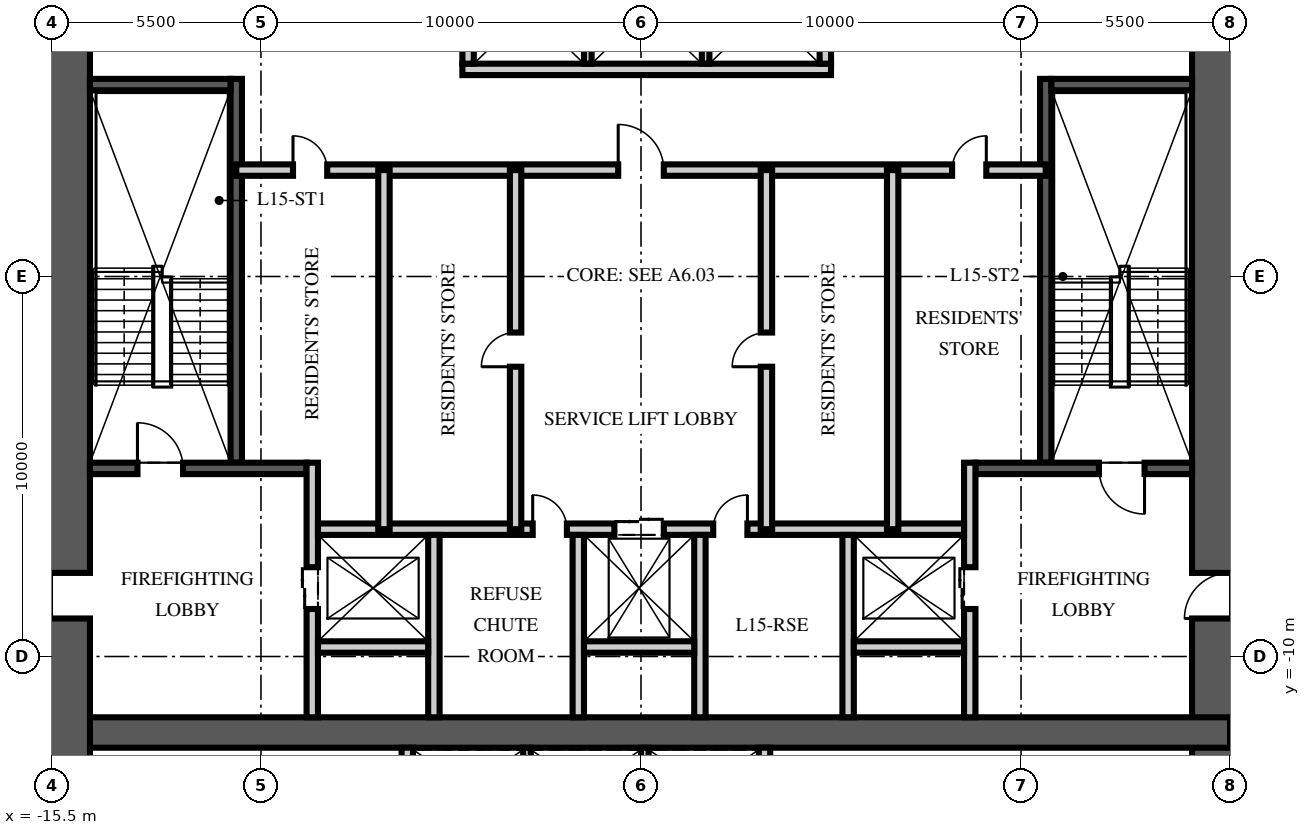
"""IFC4 building model, lengths in metres.
Left out: names, types, materials, properties, quantities, classifications, styles, units other than length and angle.
Written with IfcOpenShell. Run it as: python <this file> out.ifc"""

import sys

from ifc_helpers import new_model, si_unit, direction, frame, frame_2d, origin, place, context, subcontext, project, spatial, rectangle, extrude, element, fill, save


model = new_model("IFC4")
c1 = context("Model", 3, precision=1e-05, world=origin(), true_north=direction((0.0, 1.0)))
c2 = subcontext(c1, "Body", "Model", "MODEL_VIEW")
j1 = project(units=[si_unit("LENGTHUNIT", "METRE"), si_unit("PLANEANGLEUNIT", "RADIAN")], contexts=[c1])
p1 = place(None, origin())
s1 = spatial("IfcSite", under=j1, at=p1, CompositionType="ELEMENT")
p2 = place(p1, origin())
s2 = spatial("IfcBuilding", under=s1, at=p2, CompositionType="ELEMENT")
p3 = place(p2, frame((0.0, 0.0, 62.25)))
s3 = spatial("IfcBuildingStorey", under=s2, at=p3, CompositionType="ELEMENT", Elevation=62.25)
p4 = place(p3, frame((15.5, -15.5, -0.25), z_axis=(0.0, 0.0, 1.0), x_axis=(0.0, 1.0, 0.0)))
e1 = element("IfcWall", 1, at=p4, inside=s3, PredefinedType="SHEAR", context=c2, shape_type="SweptSolid", body=[
    extrude(rectangle(XDim=31.0, YDim=2.0, at=frame_2d((15.5, 0.0))), origin(), (0.0, 0.0, 1.0), 3.75),
])
p5 = place(p4, frame((6.5, 0.0, 0.25)))
e2 = element("IfcOpeningElement", 2, at=p5, cuts=e1, PredefinedType="OPENING", context=c2, shape_type="SweptSolid", body=[
    extrude(rectangle(XDim=1.2, YDim=2.1, at=frame_2d((0.6, 1.05))), frame((0.0, 1.01, 0.0), z_axis=(0.0, -1.0, 0.0), x_axis=(1.0, 0.0, 0.0)), (0.0, 0.0, 1.0), 2.02),
])
p6 = place(p4, frame((23.0, 0.0, 0.25)))
e3 = element("IfcOpeningElement", 3, at=p6, cuts=e1, PredefinedType="OPENING", context=c2, shape_type="SweptSolid", body=[
    extrude(rectangle(XDim=1.8, YDim=2.1, at=frame_2d((0.9, 1.05))), frame((0.0, 1.01, 0.0), z_axis=(0.0, -1.0, 0.0), x_axis=(1.0, 0.0, 0.0)), (0.0, 0.0, 1.0), 2.02),
])
p7 = place(p3, frame((-15.5, -12.0, -0.25), z_axis=(0.0, 0.0, 1.0), x_axis=(1.0, 0.0, 0.0)))
e4 = element("IfcWall", 4, at=p7, inside=s3, PredefinedType="SHEAR", context=c2, shape_type="SweptSolid", body=[
    extrude(rectangle(XDim=31.0, YDim=0.8, at=frame_2d((15.5, 0.0))), origin(), (0.0, 0.0, 1.0), 3.75),
])
p8 = place(p3, frame((-15.5, -15.5, -0.25), z_axis=(0.0, 0.0, 1.0), x_axis=(0.0, 1.0, 0.0)))
e5 = element("IfcWall", 5, at=p8, inside=s3, PredefinedType="SHEAR", context=c2, shape_type="SweptSolid", body=[
    extrude(rectangle(XDim=31.0, YDim=2.0, at=frame_2d((15.5, 0.0))), origin(), (0.0, 0.0, 1.0), 3.75),
])
p9 = place(p8, frame((6.5, 0.0, 0.25)))
e6 = element("IfcOpeningElement", 6, at=p9, cuts=e5, PredefinedType="OPENING", context=c2, shape_type="SweptSolid", body=[
    extrude(rectangle(XDim=1.2, YDim=2.1, at=frame_2d((0.6, 1.05))), frame((0.0, 1.01, 0.0), z_axis=(0.0, -1.0, 0.0), x_axis=(1.0, 0.0, 0.0)), (0.0, 0.0, 1.0), 2.02),
])
p10 = place(p8, frame((23.0, 0.0, 0.25)))
e7 = element("IfcOpeningElement", 7, at=p10, cuts=e5, PredefinedType="OPENING", context=c2, shape_type="SweptSolid", body=[
    extrude(rectangle(XDim=1.8, YDim=2.1, at=frame_2d((0.9, 1.05))), frame((0.0, 1.01, 0.0), z_axis=(0.0, -1.0, 0.0), x_axis=(1.0, 0.0, 0.0)), (0.0, 0.0, 1.0), 2.02),
])
p11 = place(p3, frame((-10.65, -4.9, 0.0), z_axis=(0.0, 0.0, 1.0), x_axis=(0.0, 1.0, 0.0)))
e8 = element("IfcWall", 8, at=p11, inside=s3, PredefinedType="SOLIDWALL", context=c2, shape_type="SweptSolid", body=[
    extrude(rectangle(XDim=10.1, YDim=0.3, at=frame_2d((5.05, 0.0))), origin(), (0.0, 0.0, 1.0), 3.5),
])
p12 = place(p3, frame((-14.5, -5.05, 0.0), z_axis=(0.0, 0.0, 1.0), x_axis=(1.0, 0.0, 0.0)))
e9 = element("IfcWall", 9, at=p12, inside=s3, PredefinedType="SOLIDWALL", context=c2, shape_type="SweptSolid", body=[
    extrude(rectangle(XDim=5.7, YDim=0.3, at=frame_2d((2.85, 0.0))), origin(), (0.0, 0.0, 1.0), 3.5),
])
p13 = place(p12, frame((1.25, 0.0, 0.0)))
e10 = element("IfcOpeningElement", 10, at=p13, cuts=e9, PredefinedType="OPENING", context=c2, shape_type="SweptSolid", body=[
    extrude(rectangle(XDim=1.2, YDim=2.1, at=frame_2d((0.6, 1.05))), frame((0.0, 0.16, 0.0), z_axis=(0.0, -1.0, 0.0), x_axis=(1.0, 0.0, 0.0)), (0.0, 0.0, 1.0), 0.32),
])
p14 = place(p3, frame((-14.5, 5.05, 0.0), z_axis=(0.0, 0.0, 1.0), x_axis=(1.0, 0.0, 0.0)))
e11 = element("IfcWall", 11, at=p14, inside=s3, PredefinedType="SOLIDWALL", context=c2, shape_type="SweptSolid", body=[
    extrude(rectangle(XDim=3.7, YDim=0.3, at=frame_2d((1.85, 0.0))), origin(), (0.0, 0.0, 1.0), 3.5),
])
p15 = place(p3, frame((-8.65, -11.6, 0.0), z_axis=(0.0, 0.0, 1.0), x_axis=(0.0, 1.0, 0.0)))
e12 = element("IfcWall", 12, at=p15, inside=s3, PredefinedType="PARTITIONING", context=c2, shape_type="SweptSolid", body=[
    extrude(rectangle(XDim=6.7, YDim=0.3, at=frame_2d((3.35, 0.0))), origin(), (0.0, 0.0, 1.0), 3.5),
])
p16 = place(p15, frame((2.85, 0.0, 0.0)))
e13 = element("IfcOpeningElement", 13, at=p16, cuts=e12, PredefinedType="OPENING", context=c2, shape_type="SweptSolid", body=[
    extrude(rectangle(XDim=1.1, YDim=2.1, at=frame_2d((0.55, 1.05))), frame((0.0, 0.16, 0.0), z_axis=(0.0, -1.0, 0.0), x_axis=(1.0, 0.0, 0.0)), (0.0, 0.0, 1.0), 0.32),
])
p17 = place(p3, frame((10.65, -4.9, 0.0), z_axis=(0.0, 0.0, 1.0), x_axis=(0.0, 1.0, 0.0)))
e14 = element("IfcWall", 14, at=p17, inside=s3, PredefinedType="SOLIDWALL", context=c2, shape_type="SweptSolid", body=[
    extrude(rectangle(XDim=10.1, YDim=0.3, at=frame_2d((5.05, 0.0))), origin(), (0.0, 0.0, 1.0), 3.5),
])
p18 = place(p3, frame((14.5, -5.05, 0.0), z_axis=(0.0, 0.0, 1.0), x_axis=(-1.0, 0.0, 0.0)))
e15 = element("IfcWall", 15, at=p18, inside=s3, PredefinedType="SOLIDWALL", context=c2, shape_type="SweptSolid", body=[
    extrude(rectangle(XDim=5.7, YDim=0.3, at=frame_2d((2.85, 0.0))), origin(), (0.0, 0.0, 1.0), 3.5),
])
p19 = place(p18, frame((1.25, 0.0, 0.0)))
e16 = element("IfcOpeningElement", 16, at=p19, cuts=e15, PredefinedType="OPENING", context=c2, shape_type="SweptSolid", body=[
    extrude(rectangle(XDim=1.2, YDim=2.1, at=frame_2d((0.6, 1.05))), frame((0.0, 0.16, 0.0), z_axis=(0.0, -1.0, 0.0), x_axis=(1.0, 0.0, 0.0)), (0.0, 0.0, 1.0), 0.32),
])
p20 = place(p3, frame((14.5, 5.05, 0.0), z_axis=(0.0, 0.0, 1.0), x_axis=(-1.0, 0.0, 0.0)))
e17 = element("IfcWall", 17, at=p20, inside=s3, PredefinedType="SOLIDWALL", context=c2, shape_type="SweptSolid", body=[
    extrude(rectangle(XDim=3.7, YDim=0.3, at=frame_2d((1.85, 0.0))), origin(), (0.0, 0.0, 1.0), 3.5),
])
p21 = place(p3, frame((8.65, -11.6, 0.0), z_axis=(0.0, 0.0, 1.0), x_axis=(0.0, 1.0, 0.0)))
e18 = element("IfcWall", 18, at=p21, inside=s3, PredefinedType="PARTITIONING", context=c2, shape_type="SweptSolid", body=[
    extrude(rectangle(XDim=6.7, YDim=0.3, at=frame_2d((3.35, 0.0))), origin(), (0.0, 0.0, 1.0), 3.5),
])
p22 = place(p21, frame((2.85, 0.0, 0.0)))
e19 = element("IfcOpeningElement", 19, at=p22, cuts=e18, PredefinedType="OPENING", context=c2, shape_type="SweptSolid", body=[
    extrude(rectangle(XDim=1.1, YDim=2.1, at=frame_2d((0.55, 1.05))), frame((0.0, 0.16, 0.0), z_axis=(0.0, -1.0, 0.0), x_axis=(1.0, 0.0, 0.0)), (0.0, 0.0, 1.0), 0.32),
])
p23 = place(p3, frame((-8.5, -6.65, 0.0), z_axis=(0.0, 0.0, 1.0), x_axis=(1.0, 0.0, 0.0)))
e20 = element("IfcWall", 20, at=p23, inside=s3, PredefinedType="PARTITIONING", context=c2, shape_type="SweptSolid", body=[
    extrude(rectangle(XDim=17.0, YDim=0.3, at=frame_2d((8.5, 0.0))), origin(), (0.0, 0.0, 1.0), 3.5),
])
p24 = place(p23, frame((7.8, 0.0, 0.0)))
e21 = element("IfcOpeningElement", 21, at=p24, cuts=e20, PredefinedType="OPENING", context=c2, shape_type="SweptSolid", body=[
    extrude(rectangle(XDim=1.3, YDim=2.4, at=frame_2d((0.65, 1.2))), frame((0.0, 0.16, 0.0), z_axis=(0.0, -1.0, 0.0), x_axis=(1.0, 0.0, 0.0)), (0.0, 0.0, 1.0), 0.32),
])
p25 = place(p23, frame((5.65, 0.0, 0.0)))
e22 = element("IfcOpeningElement", 22, at=p25, cuts=e20, PredefinedType="OPENING", context=c2, shape_type="SweptSolid", body=[
    extrude(rectangle(XDim=0.9, YDim=2.1, at=frame_2d((0.45, 1.05))), frame((0.0, 0.16, 0.0), z_axis=(0.0, -1.0, 0.0), x_axis=(1.0, 0.0, 0.0)), (0.0, 0.0, 1.0), 0.32),
])
p26 = place(p23, frame((10.4, 0.0, 0.0)))
e23 = element("IfcOpeningElement", 23, at=p26, cuts=e20, PredefinedType="OPENING", context=c2, shape_type="SweptSolid", body=[
    extrude(rectangle(XDim=0.9, YDim=2.1, at=frame_2d((0.45, 1.05))), frame((0.0, 0.16, 0.0), z_axis=(0.0, -1.0, 0.0), x_axis=(1.0, 0.0, 0.0)), (0.0, 0.0, 1.0), 0.32),
])
for number, where, z_axis, x_axis in (
    (24, (-5.45, -11.6, 0.0), (0.0, 0.0, 1.0), (0.0, 1.0, 0.0)),
    (25, (-1.65, -11.6, 0.0), (0.0, 0.0, 1.0), (0.0, 1.0, 0.0)),
    (26, (1.55, -11.6, 0.0), (0.0, 0.0, 1.0), (0.0, 1.0, 0.0)),
    (27, (5.45, -11.6, 0.0), (0.0, 0.0, 1.0), (0.0, 1.0, 0.0)),
):
    element("IfcWall", number, at=place(p3, frame(where, z_axis=z_axis, x_axis=x_axis)), inside=s3, PredefinedType="PARTITIONING", context=c2, shape_type="SweptSolid", body=[
        extrude(rectangle(XDim=4.8, YDim=0.3, at=frame_2d((2.4, 0.0))), origin(), (0.0, 0.0, 1.0), 3.5),
    ])
for number, where, z_axis, x_axis in (
    (28, (-8.5, -9.75, 0.0), (0.0, 0.0, 1.0), (1.0, 0.0, 0.0)),
    (29, (-1.5, -9.75, 0.0), (0.0, 0.0, 1.0), (1.0, 0.0, 0.0)),
    (30, (5.6, -9.75, 0.0), (0.0, 0.0, 1.0), (1.0, 0.0, 0.0)),
):
    element("IfcWall", number, at=place(p3, frame(where, z_axis=z_axis, x_axis=x_axis)), inside=s3, PredefinedType="PARTITIONING", context=c2, shape_type="SweptSolid", body=[
        extrude(rectangle(XDim=2.9, YDim=0.3, at=frame_2d((1.45, 0.0))), origin(), (0.0, 0.0, 1.0), 3.5),
    ])
p27 = place(p3, frame((-4.7, 5.45, 0.0), z_axis=(0.0, 0.0, 1.0), x_axis=(1.0, 0.0, 0.0)))
e31 = element("IfcWall", 31, at=p27, inside=s3, PredefinedType="PARTITIONING", context=c2, shape_type="SweptSolid", body=[
    extrude(rectangle(XDim=9.7, YDim=0.3, at=frame_2d((4.85, 0.0))), origin(), (0.0, 0.0, 1.0), 3.5),
])
for number, where, z_axis, x_axis in (
    (32, (-4.55, 5.6, 0.0), (0.0, 0.0, 1.0), (0.0, 1.0, 0.0)),
    (33, (4.85, 5.6, 0.0), (0.0, 0.0, 1.0), (0.0, 1.0, 0.0)),
):
    element("IfcWall", number, at=place(p3, frame(where, z_axis=z_axis, x_axis=x_axis)), inside=s3, PredefinedType="PARTITIONING", context=c2, shape_type="SweptSolid", body=[
        extrude(rectangle(XDim=2.8, YDim=0.3, at=frame_2d((1.4, 0.0))), origin(), (0.0, 0.0, 1.0), 3.5),
    ])
for number, where, z_axis, x_axis in (
    (34, (-1.4, 5.6, 0.0), (0.0, 0.0, 1.0), (0.0, 1.0, 0.0)),
    (35, (1.7, 5.6, 0.0), (0.0, 0.0, 1.0), (0.0, 1.0, 0.0)),
):
    element("IfcWall", number, at=place(p3, frame(where, z_axis=z_axis, x_axis=x_axis)), inside=s3, PredefinedType="PARTITIONING", context=c2, shape_type="SweptSolid", body=[
        extrude(rectangle(XDim=2.8, YDim=0.2, at=frame_2d((1.4, 0.0))), origin(), (0.0, 0.0, 1.0), 3.5),
    ])
for number, where, z_axis, x_axis in (
    (36, (-6.15, -14.5, 0.0), (0.0, 0.0, 1.0), (0.0, 1.0, 0.0)),
    (37, (3.25, -14.5, 0.0), (0.0, 0.0, 1.0), (0.0, 1.0, 0.0)),
):
    element("IfcWall", number, at=place(p3, frame(where, z_axis=z_axis, x_axis=x_axis)), inside=s3, PredefinedType="PARTITIONING", context=c2, shape_type="SweptSolid", body=[
        extrude(rectangle(XDim=2.1, YDim=0.3, at=frame_2d((1.05, 0.0))), origin(), (0.0, 0.0, 1.0), 3.5),
    ])
for number, where, z_axis, x_axis in (
    (38, (-3.0, -14.5, 0.0), (0.0, 0.0, 1.0), (0.0, 1.0, 0.0)),
    (39, (0.1, -14.5, 0.0), (0.0, 0.0, 1.0), (0.0, 1.0, 0.0)),
):
    element("IfcWall", number, at=place(p3, frame(where, z_axis=z_axis, x_axis=x_axis)), inside=s3, PredefinedType="PARTITIONING", context=c2, shape_type="SweptSolid", body=[
        extrude(rectangle(XDim=2.1, YDim=0.2, at=frame_2d((1.05, 0.0))), origin(), (0.0, 0.0, 1.0), 3.5),
    ])
p28 = place(p3, frame((-10.65, 2.8, 0.0), z_axis=(0.0, 0.0, 1.0), x_axis=(1.0, 0.0, 0.0)))
e40 = element("IfcWall", 40, at=p28, inside=s3, PredefinedType="PARTITIONING", context=c2, shape_type="SweptSolid", body=[
    extrude(rectangle(XDim=21.3, YDim=0.3, at=frame_2d((10.65, 0.0))), origin(), (0.0, 0.0, 1.0), 3.5),
])
p29 = place(p28, frame((10.05, 0.0, 0.0)))
e41 = element("IfcOpeningElement", 41, at=p29, cuts=e40, PredefinedType="OPENING", context=c2, shape_type="SweptSolid", body=[
    extrude(rectangle(XDim=1.2, YDim=2.1, at=frame_2d((0.6, 1.05))), frame((0.0, 0.16, 0.0), z_axis=(0.0, -1.0, 0.0), x_axis=(1.0, 0.0, 0.0)), (0.0, 0.0, 1.0), 0.32),
])
p30 = place(p28, frame((1.493, 0.0, 0.0)))
e42 = element("IfcOpeningElement", 42, at=p30, cuts=e40, PredefinedType="OPENING", context=c2, shape_type="SweptSolid", body=[
    extrude(rectangle(XDim=0.9, YDim=2.1, at=frame_2d((0.45, 1.05))), frame((0.0, 0.16, 0.0), z_axis=(0.0, -1.0, 0.0), x_axis=(1.0, 0.0, 0.0)), (0.0, 0.0, 1.0), 0.32),
])
p31 = place(p28, frame((18.836, 0.0, 0.0)))
e43 = element("IfcOpeningElement", 43, at=p31, cuts=e40, PredefinedType="OPENING", context=c2, shape_type="SweptSolid", body=[
    extrude(rectangle(XDim=0.9, YDim=2.1, at=frame_2d((0.45, 1.05))), frame((0.0, 0.16, 0.0), z_axis=(0.0, -1.0, 0.0), x_axis=(1.0, 0.0, 0.0)), (0.0, 0.0, 1.0), 0.32),
])
p32 = place(p3, frame((-3.3, -6.65, 0.0), z_axis=(0.0, 0.0, 1.0), x_axis=(0.0, 1.0, 0.0)))
e44 = element("IfcWall", 44, at=p32, inside=s3, PredefinedType="PARTITIONING", context=c2, shape_type="SweptSolid", body=[
    extrude(rectangle(XDim=9.45, YDim=0.3, at=frame_2d((4.725, 0.0))), origin(), (0.0, 0.0, 1.0), 3.5),
])
p33 = place(p32, frame((4.275, 0.0, 0.0)))
e45 = element("IfcOpeningElement", 45, at=p33, cuts=e44, PredefinedType="OPENING", context=c2, shape_type="SweptSolid", body=[
    extrude(rectangle(XDim=0.9, YDim=2.1, at=frame_2d((0.45, 1.05))), frame((0.0, 0.16, 0.0), z_axis=(0.0, -1.0, 0.0), x_axis=(1.0, 0.0, 0.0)), (0.0, 0.0, 1.0), 0.32),
])
p34 = place(p3, frame((3.3, -6.65, 0.0), z_axis=(0.0, 0.0, 1.0), x_axis=(0.0, 1.0, 0.0)))
e46 = element("IfcWall", 46, at=p34, inside=s3, PredefinedType="PARTITIONING", context=c2, shape_type="SweptSolid", body=[
    extrude(rectangle(XDim=9.45, YDim=0.3, at=frame_2d((4.725, 0.0))), origin(), (0.0, 0.0, 1.0), 3.5),
])
p35 = place(p34, frame((4.275, 0.0, 0.0)))
e47 = element("IfcOpeningElement", 47, at=p35, cuts=e46, PredefinedType="OPENING", context=c2, shape_type="SweptSolid", body=[
    extrude(rectangle(XDim=0.9, YDim=2.1, at=frame_2d((0.45, 1.05))), frame((0.0, 0.16, 0.0), z_axis=(0.0, -1.0, 0.0), x_axis=(1.0, 0.0, 0.0)), (0.0, 0.0, 1.0), 0.32),
])
for number, where, z_axis, x_axis in (
    (48, (-6.764, -6.65, 0.0), (0.0, 0.0, 1.0), (0.0, 1.0, 0.0)),
    (49, (6.622, -6.65, 0.0), (0.0, 0.0, 1.0), (0.0, 1.0, 0.0)),
):
    element("IfcWall", number, at=place(p3, frame(where, z_axis=z_axis, x_axis=x_axis)), inside=s3, PredefinedType="PARTITIONING", context=c2, shape_type="SweptSolid", body=[
        extrude(rectangle(XDim=9.45, YDim=0.3, at=frame_2d((4.725, 0.0))), origin(), (0.0, 0.0, 1.0), 3.5),
    ])
p36 = place(p13, origin())
e50 = element("IfcDoor", 50, at=p36, inside=s3, OperationType="SINGLE_SWING_LEFT", PredefinedType="DOOR", context=c2, shape_type="SweptSolid", body=[
    extrude(rectangle(XDim=1.2, YDim=2.1, at=frame_2d((0.6, 1.05))), frame((0.0, 0.025, 0.0), z_axis=(0.0, -1.0, 0.0), x_axis=(1.0, 0.0, 0.0)), (0.0, 0.0, 1.0), 0.05),
])
fill(e10, e50)
p37 = place(p9, origin())
e51 = element("IfcDoor", 51, at=p37, inside=s3, OperationType="SINGLE_SWING_LEFT", PredefinedType="DOOR", context=c2, shape_type="SweptSolid", body=[
    extrude(rectangle(XDim=1.2, YDim=2.1, at=frame_2d((0.6, 1.05))), frame((0.0, 0.025, 0.0), z_axis=(0.0, -1.0, 0.0), x_axis=(1.0, 0.0, 0.0)), (0.0, 0.0, 1.0), 0.05),
])
fill(e6, e51)
p38 = place(p19, origin())
e52 = element("IfcDoor", 52, at=p38, inside=s3, OperationType="SINGLE_SWING_LEFT", PredefinedType="DOOR", context=c2, shape_type="SweptSolid", body=[
    extrude(rectangle(XDim=1.2, YDim=2.1, at=frame_2d((0.6, 1.05))), frame((0.0, 0.025, 0.0), z_axis=(0.0, -1.0, 0.0), x_axis=(1.0, 0.0, 0.0)), (0.0, 0.0, 1.0), 0.05),
])
fill(e16, e52)
p39 = place(p5, origin())
e53 = element("IfcDoor", 53, at=p39, inside=s3, OperationType="SINGLE_SWING_LEFT", PredefinedType="DOOR", context=c2, shape_type="SweptSolid", body=[
    extrude(rectangle(XDim=1.2, YDim=2.1, at=frame_2d((0.6, 1.05))), frame((0.0, 0.025, 0.0), z_axis=(0.0, -1.0, 0.0), x_axis=(1.0, 0.0, 0.0)), (0.0, 0.0, 1.0), 0.05),
])
fill(e2, e53)
p40 = place(p16, origin())
e54 = element("IfcDoor", 54, at=p40, inside=s3, OperationType="DOUBLE_DOOR_SLIDING", PredefinedType="DOOR", context=c2, shape_type="SweptSolid", body=[
    extrude(rectangle(XDim=1.1, YDim=2.1, at=frame_2d((0.55, 1.05))), frame((0.0, 0.025, 0.0), z_axis=(0.0, -1.0, 0.0), x_axis=(1.0, 0.0, 0.0)), (0.0, 0.0, 1.0), 0.05),
])
fill(e13, e54)
p41 = place(p22, origin())
e55 = element("IfcDoor", 55, at=p41, inside=s3, OperationType="DOUBLE_DOOR_SLIDING", PredefinedType="DOOR", context=c2, shape_type="SweptSolid", body=[
    extrude(rectangle(XDim=1.1, YDim=2.1, at=frame_2d((0.55, 1.05))), frame((0.0, 0.025, 0.0), z_axis=(0.0, -1.0, 0.0), x_axis=(1.0, 0.0, 0.0)), (0.0, 0.0, 1.0), 0.05),
])
fill(e19, e55)
p42 = place(p24, origin())
e56 = element("IfcDoor", 56, at=p42, inside=s3, OperationType="DOUBLE_DOOR_SLIDING", PredefinedType="DOOR", context=c2, shape_type="SweptSolid", body=[
    extrude(rectangle(XDim=1.3, YDim=2.4, at=frame_2d((0.65, 1.2))), frame((0.0, 0.025, 0.0), z_axis=(0.0, -1.0, 0.0), x_axis=(1.0, 0.0, 0.0)), (0.0, 0.0, 1.0), 0.05),
])
fill(e21, e56)
p43 = place(p29, origin())
e57 = element("IfcDoor", 57, at=p43, inside=s3, OperationType="SINGLE_SWING_LEFT", PredefinedType="DOOR", context=c2, shape_type="SweptSolid", body=[
    extrude(rectangle(XDim=1.2, YDim=2.1, at=frame_2d((0.6, 1.05))), frame((0.0, 0.025, 0.0), z_axis=(0.0, -1.0, 0.0), x_axis=(1.0, 0.0, 0.0)), (0.0, 0.0, 1.0), 0.05),
])
fill(e41, e57)
p44 = place(p25, origin())
e58 = element("IfcDoor", 58, at=p44, inside=s3, OperationType="SINGLE_SWING_LEFT", PredefinedType="DOOR", context=c2, shape_type="SweptSolid", body=[
    extrude(rectangle(XDim=0.9, YDim=2.1, at=frame_2d((0.45, 1.05))), frame((0.0, 0.025, 0.0), z_axis=(0.0, -1.0, 0.0), x_axis=(1.0, 0.0, 0.0)), (0.0, 0.0, 1.0), 0.05),
])
fill(e22, e58)
p45 = place(p26, origin())
e59 = element("IfcDoor", 59, at=p45, inside=s3, OperationType="SINGLE_SWING_RIGHT", PredefinedType="DOOR", context=c2, shape_type="SweptSolid", body=[
    extrude(rectangle(XDim=0.9, YDim=2.1, at=frame_2d((0.45, 1.05))), frame((0.0, 0.025, 0.0), z_axis=(0.0, -1.0, 0.0), x_axis=(1.0, 0.0, 0.0)), (0.0, 0.0, 1.0), 0.05),
])
fill(e23, e59)
p46 = place(p33, origin())
e60 = element("IfcDoor", 60, at=p46, inside=s3, OperationType="SINGLE_SWING_LEFT", PredefinedType="DOOR", context=c2, shape_type="SweptSolid", body=[
    extrude(rectangle(XDim=0.9, YDim=2.1, at=frame_2d((0.45, 1.05))), frame((0.0, 0.025, 0.0), z_axis=(0.0, -1.0, 0.0), x_axis=(1.0, 0.0, 0.0)), (0.0, 0.0, 1.0), 0.05),
])
fill(e45, e60)
p47 = place(p30, origin())
e61 = element("IfcDoor", 61, at=p47, inside=s3, OperationType="SINGLE_SWING_LEFT", PredefinedType="DOOR", context=c2, shape_type="SweptSolid", body=[
    extrude(rectangle(XDim=0.9, YDim=2.1, at=frame_2d((0.45, 1.05))), frame((0.0, 0.025, 0.0), z_axis=(0.0, -1.0, 0.0), x_axis=(1.0, 0.0, 0.0)), (0.0, 0.0, 1.0), 0.05),
])
fill(e42, e61)
p48 = place(p35, origin())
e62 = element("IfcDoor", 62, at=p48, inside=s3, OperationType="SINGLE_SWING_LEFT", PredefinedType="DOOR", context=c2, shape_type="SweptSolid", body=[
    extrude(rectangle(XDim=0.9, YDim=2.1, at=frame_2d((0.45, 1.05))), frame((0.0, 0.025, 0.0), z_axis=(0.0, -1.0, 0.0), x_axis=(1.0, 0.0, 0.0)), (0.0, 0.0, 1.0), 0.05),
])
fill(e47, e62)
p49 = place(p31, origin())
e63 = element("IfcDoor", 63, at=p49, inside=s3, OperationType="SINGLE_SWING_RIGHT", PredefinedType="DOOR", context=c2, shape_type="SweptSolid", body=[
    extrude(rectangle(XDim=0.9, YDim=2.1, at=frame_2d((0.45, 1.05))), frame((0.0, 0.025, 0.0), z_axis=(0.0, -1.0, 0.0), x_axis=(1.0, 0.0, 0.0)), (0.0, 0.0, 1.0), 0.05),
])
fill(e43, e63)
save(model, sys.argv[1])
